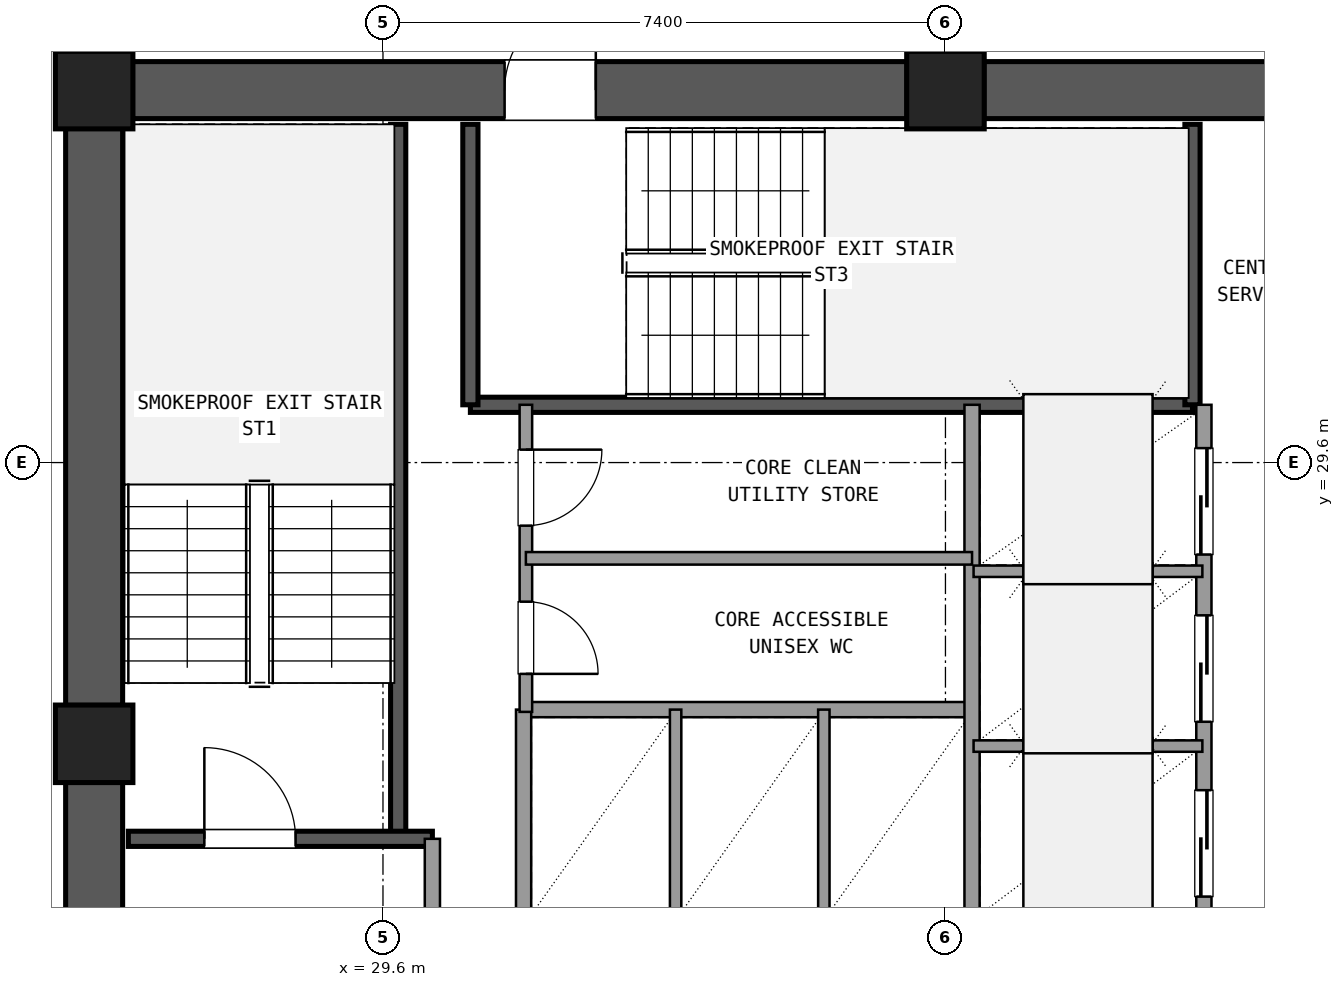
"""IFC4 building model, lengths in metres.
Left out: names, types, materials, properties, quantities, classifications, styles, units other than length and angle.
Written with IfcOpenShell. Run it as: python <this file> out.ifc"""

import sys

from ifc_helpers import new_model, si_unit, direction, frame, frame_2d, origin, origin_2d, place, context, subcontext, project, spatial, rectangle, extrude, element, fill, save


model = new_model("IFC4")
c1 = context("Model", 3, precision=1e-05, world=origin(), true_north=direction((0.0, 1.0)))
c2 = subcontext(c1, "Body", "Model", "MODEL_VIEW")
j1 = project(units=[si_unit("LENGTHUNIT", "METRE"), si_unit("PLANEANGLEUNIT", "RADIAN")], contexts=[c1])
p1 = place(None, origin())
s1 = spatial("IfcSite", under=j1, at=p1, CompositionType="ELEMENT")
p2 = place(p1, origin())
s2 = spatial("IfcBuilding", under=s1, at=p2, CompositionType="ELEMENT")
p3 = place(p2, frame((0.0, 0.0, 167.22)))
s3 = spatial("IfcBuildingStorey", under=s2, at=p3, CompositionType="ELEMENT", Elevation=167.22)
for number, where, z_axis, x_axis in (
    (1, (37.0, 34.5, 0.0), (0.0, 0.0, 1.0), (1.0, 0.0, 0.0)),
    (2, (25.8, 34.5, 0.0), (0.0, 0.0, 1.0), (1.0, 0.0, 0.0)),
    (3, (25.8, 25.9, 0.0), (0.0, 0.0, 1.0), (1.0, 0.0, 0.0)),
):
    element("IfcColumn", number, at=place(p3, frame(where, z_axis=z_axis, x_axis=x_axis)), inside=s3, PredefinedType="COLUMN", context=c2, shape_type="SweptSolid", body=[
        extrude(rectangle(XDim=1.02, YDim=1.02, at=origin_2d()), origin(), (0.0, 0.0, 1.0), 3.6),
    ])
p4 = place(p3, frame((47.695, 34.5, 0.0), z_axis=(0.0, 0.0, 1.0), x_axis=(-1.0, 0.0, 0.0)))
e4 = element("IfcWall", 4, at=p4, inside=s3, PredefinedType="SHEAR", context=c2, shape_type="SweptSolid", body=[
    extrude(rectangle(XDim=10.19, YDim=0.75, at=frame_2d((5.095, 0.0))), origin(), (0.0, 0.0, 1.0), 3.32),
])
p5 = place(p4, frame((4.595, 0.0, 0.0)))
e5 = element("IfcOpeningElement", 5, at=p5, cuts=e4, PredefinedType="OPENING", context=c2, shape_type="SweptSolid", body=[
    extrude(rectangle(XDim=1.6, YDim=2.2, at=frame_2d((0.8, 1.1))), frame((0.0, 0.385, 0.0), z_axis=(0.0, -1.0, 0.0), x_axis=(1.0, 0.0, 0.0)), (0.0, 0.0, 1.0), 0.77),
])
p6 = place(p3, frame((36.495, 34.5, 0.0), z_axis=(0.0, 0.0, 1.0), x_axis=(-1.0, 0.0, 0.0)))
e6 = element("IfcWall", 6, at=p6, inside=s3, PredefinedType="SHEAR", context=c2, shape_type="SweptSolid", body=[
    extrude(rectangle(XDim=10.19, YDim=0.75, at=frame_2d((5.095, 0.0))), origin(), (0.0, 0.0, 1.0), 3.32),
])
p7 = place(p6, frame((4.095, 0.0, 0.0)))
e7 = element("IfcOpeningElement", 7, at=p7, cuts=e6, PredefinedType="OPENING", context=c2, shape_type="SweptSolid", body=[
    extrude(rectangle(XDim=1.2, YDim=2.15, at=frame_2d((0.6, 1.075))), frame((0.0, 0.385, 0.0), z_axis=(0.0, -1.0, 0.0), x_axis=(1.0, 0.0, 0.0)), (0.0, 0.0, 1.0), 0.77),
])
p8 = place(p3, frame((25.8, 33.995, 0.0), z_axis=(0.0, 0.0, 1.0), x_axis=(0.0, -1.0, 0.0)))
e8 = element("IfcWall", 8, at=p8, inside=s3, PredefinedType="SHEAR", context=c2, shape_type="SweptSolid", body=[
    extrude(rectangle(XDim=7.59, YDim=0.75, at=frame_2d((3.795, 0.0))), origin(), (0.0, 0.0, 1.0), 3.32),
])
p9 = place(p3, frame((25.8, 25.395, 0.0), z_axis=(0.0, 0.0, 1.0), x_axis=(0.0, -1.0, 0.0)))
e9 = element("IfcWall", 9, at=p9, inside=s3, PredefinedType="SHEAR", context=c2, shape_type="SweptSolid", body=[
    extrude(rectangle(XDim=7.59, YDim=0.75, at=frame_2d((3.795, 0.0))), origin(), (0.0, 0.0, 1.0), 3.32),
])
p10 = place(p9, frame((2.145, 0.0, 0.0)))
e10 = element("IfcOpeningElement", 10, at=p10, cuts=e9, PredefinedType="OPENING", context=c2, shape_type="SweptSolid", body=[
    extrude(rectangle(XDim=1.2, YDim=2.15, at=frame_2d((0.6, 1.075))), frame((0.0, 0.385, 0.0), z_axis=(0.0, -1.0, 0.0), x_axis=(1.0, 0.0, 0.0)), (0.0, 0.0, 1.0), 0.77),
])
p11 = place(p3, frame((29.8, 24.65, 0.0), z_axis=(0.0, 0.0, 1.0), x_axis=(0.0, 1.0, 0.0)))
e11 = element("IfcWall", 11, at=p11, inside=s3, PredefinedType="SHEAR", context=c2, shape_type="SweptSolid", body=[
    extrude(rectangle(XDim=9.4, YDim=0.2, at=frame_2d((4.7, 0.0))), origin(), (0.0, 0.0, 1.0), 3.32),
])
p12 = place(p3, frame((26.25, 24.65, 0.0), z_axis=(0.0, 0.0, 1.0), x_axis=(1.0, 0.0, 0.0)))
e12 = element("IfcWall", 12, at=p12, inside=s3, PredefinedType="SHEAR", context=c2, shape_type="SweptSolid", body=[
    extrude(rectangle(XDim=4.0, YDim=0.2, at=frame_2d((2.0, 0.0))), origin(), (0.0, 0.0, 1.0), 3.32),
])
p13 = place(p12, frame((1.0, 0.0, 0.0)))
e13 = element("IfcOpeningElement", 13, at=p13, cuts=e12, PredefinedType="OPENING", context=c2, shape_type="SweptSolid", body=[
    extrude(rectangle(XDim=1.2, YDim=2.15, at=frame_2d((0.6, 1.075))), frame((0.0, 0.11, 0.0), z_axis=(0.0, -1.0, 0.0), x_axis=(1.0, 0.0, 0.0)), (0.0, 0.0, 1.0), 0.22),
])
p14 = place(p3, frame((30.75, 30.36, 0.0), z_axis=(0.0, 0.0, 1.0), x_axis=(1.0, 0.0, 0.0)))
e14 = element("IfcWall", 14, at=p14, inside=s3, PredefinedType="SHEAR", context=c2, shape_type="SweptSolid", body=[
    extrude(rectangle(XDim=9.5, YDim=0.2, at=frame_2d((4.75, 0.0))), origin(), (0.0, 0.0, 1.0), 3.32),
])
for number, where, z_axis, x_axis in (
    (15, (30.75, 30.36, 0.0), (0.0, 0.0, 1.0), (0.0, 1.0, 0.0)),
    (16, (40.25, 30.36, 0.0), (0.0, 0.0, 1.0), (0.0, 1.0, 0.0)),
):
    element("IfcWall", number, at=place(p3, frame(where, z_axis=z_axis, x_axis=x_axis)), inside=s3, PredefinedType="SHEAR", context=c2, shape_type="SweptSolid", body=[
        extrude(rectangle(XDim=3.69, YDim=0.2, at=frame_2d((1.845, 0.0))), origin(), (0.0, 0.0, 1.0), 3.32),
    ])
p15 = place(p3, frame((30.25, 17.75, 0.0), z_axis=(0.0, 0.0, 1.0), x_axis=(0.0, 1.0, 0.0)))
e17 = element("IfcWall", 17, at=p15, inside=s3, PredefinedType="SOLIDWALL", context=c2, shape_type="SweptSolid", body=[
    extrude(rectangle(XDim=6.9, YDim=0.2, at=frame_2d((3.45, 0.0))), origin(), (0.0, 0.0, 1.0), 2.61),
])
p16 = place(p15, frame((4.15, 0.0, 0.0)))
e18 = element("IfcOpeningElement", 18, at=p16, cuts=e17, PredefinedType="OPENING", context=c2, shape_type="SweptSolid", body=[
    extrude(rectangle(XDim=1.2, YDim=2.15, at=frame_2d((0.6, 1.075))), frame((0.0, 0.11, 0.0), z_axis=(0.0, -1.0, 0.0), x_axis=(1.0, 0.0, 0.0)), (0.0, 0.0, 1.0), 0.22),
])
p17 = place(p3, frame((31.45, 26.35, 0.0), z_axis=(0.0, 0.0, 1.0), x_axis=(1.0, 0.0, 0.0)))
e19 = element("IfcWall", 19, at=p17, inside=s3, PredefinedType="SOLIDWALL", context=c2, shape_type="SweptSolid", body=[
    extrude(rectangle(XDim=5.9, YDim=0.2, at=frame_2d((2.95, 0.0))), origin(), (0.0, 0.0, 1.0), 2.61),
])
p18 = place(p3, frame((31.45, 23.54, 0.0), z_axis=(0.0, 0.0, 1.0), x_axis=(0.0, 1.0, 0.0)))
e20 = element("IfcWall", 20, at=p18, inside=s3, PredefinedType="SOLIDWALL", context=c2, shape_type="SweptSolid", body=[
    extrude(rectangle(XDim=2.81, YDim=0.2, at=frame_2d((1.405, 0.0))), origin(), (0.0, 0.0, 1.0), 2.61),
])
for number, where, z_axis, x_axis in (
    (21, (33.45, 23.54, 0.0), (0.0, 0.0, 1.0), (0.0, 1.0, 0.0)),
    (22, (35.4, 23.54, 0.0), (0.0, 0.0, 1.0), (0.0, 1.0, 0.0)),
):
    element("IfcWall", number, at=place(p3, frame(where, z_axis=z_axis, x_axis=x_axis)), inside=s3, PredefinedType="PARTITIONING", context=c2, shape_type="SweptSolid", body=[
        extrude(rectangle(XDim=2.81, YDim=0.15, at=frame_2d((1.405, 0.0))), origin(), (0.0, 0.0, 1.0), 2.61),
    ])
p19 = place(p3, frame((37.35, 23.54, 0.0), z_axis=(0.0, 0.0, 1.0), x_axis=(0.0, 1.0, 0.0)))
e23 = element("IfcWall", 23, at=p19, inside=s3, PredefinedType="SOLIDWALL", context=c2, shape_type="SweptSolid", body=[
    extrude(rectangle(XDim=6.82, YDim=0.2, at=frame_2d((3.41, 0.0))), origin(), (0.0, 0.0, 1.0), 2.61),
])
p20 = place(p3, frame((40.4, 23.54, 0.0), z_axis=(0.0, 0.0, 1.0), x_axis=(0.0, 1.0, 0.0)))
e24 = element("IfcWall", 24, at=p20, inside=s3, PredefinedType="SOLIDWALL", context=c2, shape_type="SweptSolid", body=[
    extrude(rectangle(XDim=6.82, YDim=0.2, at=frame_2d((3.41, 0.0))), origin(), (0.0, 0.0, 1.0), 2.61),
])
p21 = place(p20, frame((0.35, 0.0, 0.0)))
e25 = element("IfcOpeningElement", 25, at=p21, cuts=e24, PredefinedType="OPENING", context=c2, shape_type="SweptSolid", body=[
    extrude(rectangle(XDim=1.4, YDim=2.2, at=frame_2d((0.7, 1.1))), frame((0.0, 0.11, 0.0), z_axis=(0.0, -1.0, 0.0), x_axis=(1.0, 0.0, 0.0)), (0.0, 0.0, 1.0), 0.22),
])
p22 = place(p20, frame((2.65, 0.0, 0.0)))
e26 = element("IfcOpeningElement", 26, at=p22, cuts=e24, PredefinedType="OPENING", context=c2, shape_type="SweptSolid", body=[
    extrude(rectangle(XDim=1.4, YDim=2.2, at=frame_2d((0.7, 1.1))), frame((0.0, 0.11, 0.0), z_axis=(0.0, -1.0, 0.0), x_axis=(1.0, 0.0, 0.0)), (0.0, 0.0, 1.0), 0.22),
])
p23 = place(p20, frame((4.85, 0.0, 0.0)))
e27 = element("IfcOpeningElement", 27, at=p23, cuts=e24, PredefinedType="OPENING", context=c2, shape_type="SweptSolid", body=[
    extrude(rectangle(XDim=1.4, YDim=2.2, at=frame_2d((0.7, 1.1))), frame((0.0, 0.11, 0.0), z_axis=(0.0, -1.0, 0.0), x_axis=(1.0, 0.0, 0.0)), (0.0, 0.0, 1.0), 0.22),
])
for number, where, z_axis, x_axis in (
    (28, (37.37, 25.87, 0.0), (0.0, 0.0, 1.0), (1.0, 0.0, 0.0)),
    (29, (37.37, 28.17, 0.0), (0.0, 0.0, 1.0), (1.0, 0.0, 0.0)),
):
    element("IfcWall", number, at=place(p3, frame(where, z_axis=z_axis, x_axis=x_axis)), inside=s3, PredefinedType="PARTITIONING", context=c2, shape_type="SweptSolid", body=[
        extrude(rectangle(XDim=3.01, YDim=0.15, at=frame_2d((1.505, 0.0))), origin(), (0.0, 0.0, 1.0), 2.61),
    ])
p24 = place(p3, frame((31.48, 26.32, 0.0), z_axis=(0.0, 0.0, 1.0), x_axis=(0.0, 1.0, 0.0)))
e30 = element("IfcWall", 30, at=p24, inside=s3, PredefinedType="PLUMBINGWALL", context=c2, shape_type="SweptSolid", body=[
    extrude(rectangle(XDim=4.04, YDim=0.165, at=frame_2d((2.02, 0.0))), origin(), (0.0, 0.0, 1.0), 2.61),
])
p25 = place(p24, frame((0.5, 0.0, 0.0)))
e31 = element("IfcOpeningElement", 31, at=p25, cuts=e30, PredefinedType="OPENING", context=c2, shape_type="SweptSolid", body=[
    extrude(rectangle(XDim=0.95, YDim=2.1, at=frame_2d((0.475, 1.05))), frame((0.0, 0.093, 0.0), z_axis=(0.0, -1.0, 0.0), x_axis=(1.0, 0.0, 0.0)), (0.0, 0.0, 1.0), 0.185),
])
p26 = place(p24, frame((2.45, 0.0, 0.0)))
e32 = element("IfcOpeningElement", 32, at=p26, cuts=e30, PredefinedType="OPENING", context=c2, shape_type="SweptSolid", body=[
    extrude(rectangle(XDim=1.0, YDim=2.15, at=frame_2d((0.5, 1.075))), frame((0.0, 0.093, 0.0), z_axis=(0.0, -1.0, 0.0), x_axis=(1.0, 0.0, 0.0)), (0.0, 0.0, 1.0), 0.185),
])
p27 = place(p3, frame((31.48, 28.34, 0.0), z_axis=(0.0, 0.0, 1.0), x_axis=(1.0, 0.0, 0.0)))
e33 = element("IfcWall", 33, at=p27, inside=s3, PredefinedType="PLUMBINGWALL", context=c2, shape_type="SweptSolid", body=[
    extrude(rectangle(XDim=5.87, YDim=0.165, at=frame_2d((2.935, 0.0))), origin(), (0.0, 0.0, 1.0), 2.61),
])
p28 = place(p3, frame((37.0, 34.95, 0.0), z_axis=(0.0, 0.0, 1.0), x_axis=(0.0, 1.0, 0.0)))
e34 = element("IfcWall", 34, at=p28, inside=s3, PredefinedType="PARTITIONING", context=c2, shape_type="SweptSolid", body=[
    extrude(rectangle(XDim=3.21, YDim=0.18, at=frame_2d((1.605, 0.0))), origin(), (0.0, 0.0, 1.0), 2.61),
])
p29 = place(p28, frame((0.605, 0.0, 0.0)))
e35 = element("IfcOpeningElement", 35, at=p29, cuts=e34, PredefinedType="OPENING", context=c2, shape_type="SweptSolid", body=[
    extrude(rectangle(XDim=2.0, YDim=2.2, at=frame_2d((1.0, 1.1))), frame((0.0, 0.1, 0.0), z_axis=(0.0, -1.0, 0.0), x_axis=(1.0, 0.0, 0.0)), (0.0, 0.0, 1.0), 0.2),
])
p30 = place(p13, origin())
e36 = element("IfcDoor", 36, at=p30, inside=s3, OperationType="SINGLE_SWING_LEFT", PredefinedType="DOOR", context=c2, shape_type="SweptSolid", body=[
    extrude(rectangle(XDim=1.2, YDim=2.15, at=frame_2d((0.6, 1.075))), frame((0.0, 0.025, 0.0), z_axis=(0.0, -1.0, 0.0), x_axis=(1.0, 0.0, 0.0)), (0.0, 0.0, 1.0), 0.05),
])
fill(e13, e36)
p31 = place(p7, frame((1.2, 0.0, 0.0), z_axis=(0.0, 0.0, 1.0), x_axis=(-1.0, 0.0, 0.0)))
e37 = element("IfcDoor", 37, at=p31, inside=s3, OperationType="SINGLE_SWING_LEFT", PredefinedType="DOOR", context=c2, shape_type="SweptSolid", body=[
    extrude(rectangle(XDim=1.2, YDim=2.15, at=frame_2d((0.6, 1.075))), frame((0.0, 0.025, 0.0), z_axis=(0.0, -1.0, 0.0), x_axis=(1.0, 0.0, 0.0)), (0.0, 0.0, 1.0), 0.05),
])
fill(e7, e37)
p32 = place(p21, origin())
e38 = element("IfcDoor", 38, at=p32, inside=s3, OperationType="SLIDING_TO_LEFT", PredefinedType="DOOR", context=c2, shape_type="SweptSolid", body=[
    extrude(rectangle(XDim=1.4, YDim=2.2, at=frame_2d((0.7, 1.1))), frame((0.0, 0.025, 0.0), z_axis=(0.0, -1.0, 0.0), x_axis=(1.0, 0.0, 0.0)), (0.0, 0.0, 1.0), 0.05),
])
fill(e25, e38)
p33 = place(p22, origin())
e39 = element("IfcDoor", 39, at=p33, inside=s3, OperationType="SLIDING_TO_LEFT", PredefinedType="DOOR", context=c2, shape_type="SweptSolid", body=[
    extrude(rectangle(XDim=1.4, YDim=2.2, at=frame_2d((0.7, 1.1))), frame((0.0, 0.025, 0.0), z_axis=(0.0, -1.0, 0.0), x_axis=(1.0, 0.0, 0.0)), (0.0, 0.0, 1.0), 0.05),
])
fill(e26, e39)
p34 = place(p23, origin())
e40 = element("IfcDoor", 40, at=p34, inside=s3, OperationType="SLIDING_TO_RIGHT", PredefinedType="DOOR", context=c2, shape_type="SweptSolid", body=[
    extrude(rectangle(XDim=1.4, YDim=2.2, at=frame_2d((0.7, 1.1))), frame((0.0, 0.025, 0.0), z_axis=(0.0, -1.0, 0.0), x_axis=(1.0, 0.0, 0.0)), (0.0, 0.0, 1.0), 0.05),
])
fill(e27, e40)
p35 = place(p25, frame((0.95, 0.0, 0.0), z_axis=(0.0, 0.0, 1.0), x_axis=(-1.0, 0.0, 0.0)))
e41 = element("IfcDoor", 41, at=p35, inside=s3, OperationType="SINGLE_SWING_LEFT", PredefinedType="DOOR", context=c2, shape_type="SweptSolid", body=[
    extrude(rectangle(XDim=0.95, YDim=2.1, at=frame_2d((0.475, 1.05))), frame((0.0, 0.025, 0.0), z_axis=(0.0, -1.0, 0.0), x_axis=(1.0, 0.0, 0.0)), (0.0, 0.0, 1.0), 0.05),
])
fill(e31, e41)
p36 = place(p26, frame((1.0, 0.0, 0.0), z_axis=(0.0, 0.0, 1.0), x_axis=(-1.0, 0.0, 0.0)))
e42 = element("IfcDoor", 42, at=p36, inside=s3, OperationType="SINGLE_SWING_RIGHT", PredefinedType="DOOR", context=c2, shape_type="SweptSolid", body=[
    extrude(rectangle(XDim=1.0, YDim=2.15, at=frame_2d((0.5, 1.075))), frame((0.0, 0.025, 0.0), z_axis=(0.0, -1.0, 0.0), x_axis=(1.0, 0.0, 0.0)), (0.0, 0.0, 1.0), 0.05),
])
fill(e32, e42)
save(model, sys.argv[1])
